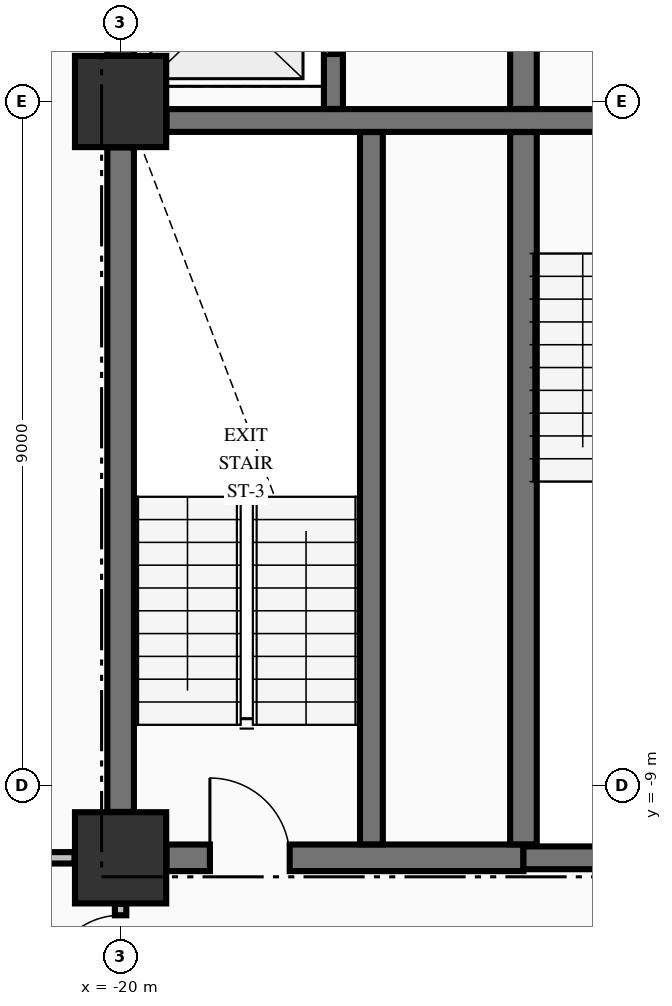
"""IFC4 building model, lengths in metres.
Left out: names, types, materials, properties, quantities, classifications, styles, units other than length and angle.
Written with IfcOpenShell. Run it as: python <this file> out.ifc"""

import sys

from ifc_helpers import new_model, si_unit, direction, frame, frame_2d, origin, origin_2d, place, context, subcontext, project, spatial, rectangle, extrude, element, fill, save


model = new_model("IFC4")
c1 = context("Model", 3, precision=1e-05, world=origin(), true_north=direction((0.0, 1.0)))
c2 = subcontext(c1, "Body", "Model", "MODEL_VIEW")
j1 = project(units=[si_unit("LENGTHUNIT", "METRE"), si_unit("PLANEANGLEUNIT", "RADIAN")], contexts=[c1])
p1 = place(None, origin())
s1 = spatial("IfcSite", under=j1, at=p1, CompositionType="ELEMENT")
p2 = place(p1, origin())
s2 = spatial("IfcBuilding", under=s1, at=p2, CompositionType="ELEMENT")
p3 = place(p2, frame((0.0, 0.0, 45.05)))
s3 = spatial("IfcBuildingStorey", under=s2, at=p3, CompositionType="ELEMENT", Elevation=45.05)
for number, where, z_axis, x_axis in (
    (1, (-20.0, -9.95, -0.25), (0.0, 0.0, 1.0), (1.0, 0.0, 0.0)),
    (2, (-20.0, 0.0, -0.25), (0.0, 0.0, 1.0), (1.0, 0.0, 0.0)),
):
    element("IfcColumn", number, at=place(p3, frame(where, z_axis=z_axis, x_axis=x_axis)), inside=s3, PredefinedType="COLUMN", context=c2, shape_type="SweptSolid", body=[
        extrude(rectangle(XDim=1.2, YDim=1.2, at=origin_2d()), origin(), (0.0, 0.0, 1.0), 3.57),
    ])
p4 = place(p3, frame((-19.396, -9.95, 0.0), z_axis=(0.0, 0.0, 1.0), x_axis=(1.0, 0.0, 0.0)))
e3 = element("IfcWall", 3, at=p4, inside=s3, PredefinedType="SHEAR", context=c2, shape_type="SweptSolid", body=[
    extrude(rectangle(XDim=4.696, YDim=0.35, at=frame_2d((2.348, 0.0))), origin(), (0.0, 0.0, 1.0), 3.32),
])
p5 = place(p4, frame((0.571, 0.0, 0.0)))
e4 = element("IfcOpeningElement", 4, at=p5, cuts=e3, PredefinedType="OPENING", context=c2, shape_type="SweptSolid", body=[
    extrude(rectangle(XDim=1.05, YDim=2.15, at=frame_2d((0.525, 1.075))), frame((0.0, 0.185, 0.0), z_axis=(0.0, -1.0, 0.0), x_axis=(1.0, 0.0, 0.0)), (0.0, 0.0, 1.0), 0.37),
])
p6 = place(p3, frame((-14.7, -9.95, 0.0), z_axis=(0.0, 0.0, 1.0), x_axis=(1.0, 0.0, 0.0)))
e5 = element("IfcWall", 5, at=p6, inside=s3, PredefinedType="SHEAR", context=c2, shape_type="SweptSolid", body=[
    extrude(rectangle(XDim=3.096, YDim=0.3, at=frame_2d((1.548, 0.0))), origin(), (0.0, 0.0, 1.0), 3.32),
])
p7 = place(p3, frame((-19.396, -0.25, 0.0), z_axis=(0.0, 0.0, 1.0), x_axis=(1.0, 0.0, 0.0)))
e6 = element("IfcWall", 6, at=p7, inside=s3, PredefinedType="SHEAR", context=c2, shape_type="SweptSolid", body=[
    extrude(rectangle(XDim=7.792, YDim=0.3, at=frame_2d((3.896, 0.0))), origin(), (0.0, 0.0, 1.0), 3.32),
])
p8 = place(p7, frame((5.696, 0.0, 0.0)))
e7 = element("IfcOpeningElement", 7, at=p8, cuts=e6, PredefinedType="OPENING", context=c2, shape_type="SweptSolid", body=[
    extrude(rectangle(XDim=1.1, YDim=2.15, at=frame_2d((0.55, 1.075))), frame((0.0, 0.16, 0.0), z_axis=(0.0, -1.0, 0.0), x_axis=(1.0, 0.0, 0.0)), (0.0, 0.0, 1.0), 0.32),
])
p9 = place(p3, frame((-23.835, -9.95, 0.0), z_axis=(0.0, 0.0, 1.0), x_axis=(1.0, 0.0, 0.0)))
e8 = element("IfcWall", 8, at=p9, inside=s3, PredefinedType="PARTITIONING", context=c2, shape_type="SweptSolid", body=[
    extrude(rectangle(XDim=3.229, YDim=0.15, at=frame_2d((1.615, 0.0))), origin(), (0.0, 0.0, 1.0), 3.32),
])
p10 = place(p9, frame((1.335, 0.0, 0.0)))
e9 = element("IfcOpeningElement", 9, at=p10, cuts=e8, PredefinedType="OPENING", context=c2, shape_type="SweptSolid", body=[
    extrude(rectangle(XDim=1.0, YDim=2.15, at=frame_2d((0.5, 1.075))), frame((0.0, 0.085, 0.0), z_axis=(0.0, -1.0, 0.0), x_axis=(1.0, 0.0, 0.0)), (0.0, 0.0, 1.0), 0.17),
])
p11 = place(p3, frame((-20.0, -9.346, 0.0), z_axis=(0.0, 0.0, 1.0), x_axis=(0.0, 1.0, 0.0)))
e10 = element("IfcWall", 10, at=p11, inside=s3, PredefinedType="SHEAR", context=c2, shape_type="SweptSolid", body=[
    extrude(rectangle(XDim=8.742, YDim=0.35, at=frame_2d((4.371, 0.0))), origin(), (0.0, 0.0, 1.0), 3.32),
])
p12 = place(p3, frame((-20.0, 0.604, 0.0), z_axis=(0.0, 0.0, 1.0), x_axis=(0.0, 1.0, 0.0)))
e11 = element("IfcWall", 11, at=p12, inside=s3, PredefinedType="SHEAR", context=c2, shape_type="SweptSolid", body=[
    extrude(rectangle(XDim=1.869, YDim=0.35, at=frame_2d((0.935, 0.0))), origin(), (0.0, 0.0, 1.0), 3.32),
])
p13 = place(p3, frame((-17.2, -0.098, 0.0), z_axis=(0.0, 0.0, 1.0), x_axis=(0.0, 1.0, 0.0)))
e12 = element("IfcWall", 12, at=p13, inside=s3, PredefinedType="SOLIDWALL", context=c2, shape_type="SweptSolid", body=[
    extrude(rectangle(XDim=2.571, YDim=0.25, at=frame_2d((1.285, 0.0))), origin(), (0.0, 0.0, 1.0), 3.32),
])
p14 = place(p13, frame((0.723, 0.0, 0.0)))
e13 = element("IfcOpeningElement", 13, at=p14, cuts=e12, PredefinedType="OPENING", context=c2, shape_type="SweptSolid", body=[
    extrude(rectangle(XDim=1.1, YDim=2.2, at=frame_2d((0.55, 1.1))), frame((0.0, 0.135, 0.0), z_axis=(0.0, -1.0, 0.0), x_axis=(1.0, 0.0, 0.0)), (0.0, 0.0, 1.0), 0.27),
])
p15 = place(p3, frame((-16.7, -9.773, 0.0), z_axis=(0.0, 0.0, 1.0), x_axis=(0.0, 1.0, 0.0)))
e14 = element("IfcWall", 14, at=p15, inside=s3, PredefinedType="SHEAR", context=c2, shape_type="SweptSolid", body=[
    extrude(rectangle(XDim=9.371, YDim=0.3, at=frame_2d((4.686, 0.0))), origin(), (0.0, 0.0, 1.0), 3.32),
])
p16 = place(p3, frame((-14.7, -9.773, 0.0), z_axis=(0.0, 0.0, 1.0), x_axis=(0.0, 1.0, 0.0)))
e15 = element("IfcWall", 15, at=p16, inside=s3, PredefinedType="SHEAR", context=c2, shape_type="SweptSolid", body=[
    extrude(rectangle(XDim=9.371, YDim=0.35, at=frame_2d((4.686, 0.0))), origin(), (0.0, 0.0, 1.0), 3.32),
])
p17 = place(p3, frame((-14.7, -0.098, 0.0), z_axis=(0.0, 0.0, 1.0), x_axis=(0.0, 1.0, 0.0)))
e16 = element("IfcWall", 16, at=p17, inside=s3, PredefinedType="SHEAR", context=c2, shape_type="SweptSolid", body=[
    extrude(rectangle(XDim=2.846, YDim=0.35, at=frame_2d((1.423, 0.0))), origin(), (0.0, 0.0, 1.0), 3.32),
])
p18 = place(p3, frame((-20.0, -12.222, 0.0), z_axis=(0.0, 0.0, 1.0), x_axis=(0.0, 1.0, 0.0)))
e17 = element("IfcWall", 17, at=p18, inside=s3, PredefinedType="PARTITIONING", context=c2, shape_type="SweptSolid", body=[
    extrude(rectangle(XDim=1.666, YDim=0.15, at=frame_2d((0.833, 0.0))), origin(), (0.0, 0.0, 1.0), 3.32),
])
p19 = place(p18, frame((0.566, 0.0, 0.0)))
e18 = element("IfcOpeningElement", 18, at=p19, cuts=e17, PredefinedType="OPENING", context=c2, shape_type="SweptSolid", body=[
    extrude(rectangle(XDim=0.95, YDim=2.15, at=frame_2d((0.475, 1.075))), frame((0.0, 0.085, 0.0), z_axis=(0.0, -1.0, 0.0), x_axis=(1.0, 0.0, 0.0)), (0.0, 0.0, 1.0), 0.17),
])
p20 = place(p5, origin())
e19 = element("IfcDoor", 19, at=p20, inside=s3, OperationType="SINGLE_SWING_LEFT", PredefinedType="DOOR", context=c2, shape_type="SweptSolid", body=[
    extrude(rectangle(XDim=1.05, YDim=2.15, at=frame_2d((0.525, 1.075))), frame((0.0, 0.025, 0.0), z_axis=(0.0, -1.0, 0.0), x_axis=(1.0, 0.0, 0.0)), (0.0, 0.0, 1.0), 0.05),
])
fill(e4, e19)
p21 = place(p14, origin())
e20 = element("IfcDoor", 20, at=p21, inside=s3, OperationType="SLIDING_TO_LEFT", PredefinedType="DOOR", context=c2, shape_type="SweptSolid", body=[
    extrude(rectangle(XDim=1.1, YDim=2.2, at=frame_2d((0.55, 1.1))), frame((0.0, 0.025, 0.0), z_axis=(0.0, -1.0, 0.0), x_axis=(1.0, 0.0, 0.0)), (0.0, 0.0, 1.0), 0.05),
])
fill(e13, e20)
p22 = place(p19, origin())
e21 = element("IfcDoor", 21, at=p22, inside=s3, OperationType="SINGLE_SWING_LEFT", PredefinedType="DOOR", context=c2, shape_type="SweptSolid", body=[
    extrude(rectangle(XDim=0.95, YDim=2.15, at=frame_2d((0.475, 1.075))), frame((0.0, 0.025, 0.0), z_axis=(0.0, -1.0, 0.0), x_axis=(1.0, 0.0, 0.0)), (0.0, 0.0, 1.0), 0.05),
])
fill(e18, e21)
save(model, sys.argv[1])
